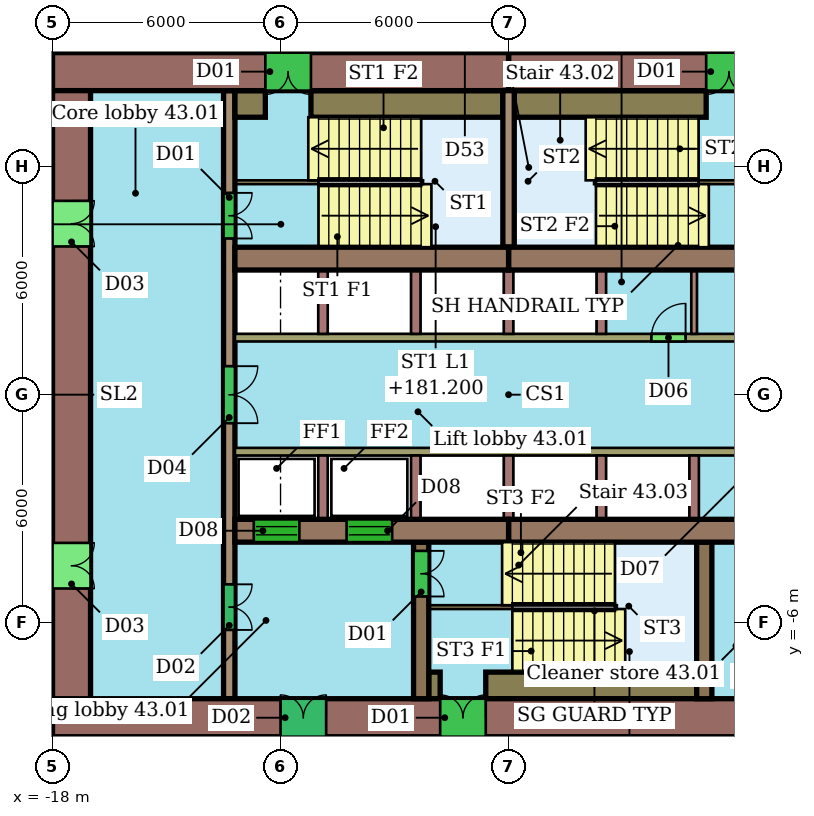
"""IFC4 building model, lengths in metres.
Left out: names, types, materials, properties, quantities, classifications, styles, units other than length and angle.
Written with IfcOpenShell. Run it as: python <this file> out.ifc"""

import sys

from ifc_helpers import new_model, si_unit, direction, frame, frame_2d, origin, place, context, subcontext, project, spatial, rectangle, extrude, element, fill, save


model = new_model("IFC4")
c1 = context("Model", 3, precision=1e-05, world=origin(), true_north=direction((0.0, 1.0)))
c2 = subcontext(c1, "Body", "Model", "MODEL_VIEW")
j1 = project(units=[si_unit("LENGTHUNIT", "METRE"), si_unit("PLANEANGLEUNIT", "RADIAN")], contexts=[c1])
p1 = place(None, origin())
s1 = spatial("IfcSite", under=j1, at=p1, CompositionType="ELEMENT")
p2 = place(p1, origin())
s2 = spatial("IfcBuilding", under=s1, at=p2, CompositionType="ELEMENT")
p3 = place(p2, frame((0.0, 0.0, 179.4)))
s3 = spatial("IfcBuildingStorey", under=s2, at=p3, CompositionType="ELEMENT", Elevation=179.4)
p4 = place(p3, frame((6.0, 8.5, 0.0), z_axis=(0.0, 0.0, 1.0), x_axis=(-1.0, 0.0, 0.0)))
e1 = element("IfcWall", 1, at=p4, inside=s3, PredefinedType="SHEAR", context=c2, shape_type="SweptSolid", body=[
    extrude(rectangle(XDim=12.0, YDim=1.0, at=frame_2d((6.0, 0.0))), origin(), (0.0, 0.0, 1.0), 3.3),
])
p5 = place(p4, frame((5.6, 0.0, 0.0)))
e2 = element("IfcOpeningElement", 2, at=p5, cuts=e1, PredefinedType="OPENING", context=c2, shape_type="SweptSolid", body=[
    extrude(rectangle(XDim=1.2, YDim=2.1, at=frame_2d((0.6, 1.05))), frame((0.0, 0.51, 0.0), z_axis=(0.0, -1.0, 0.0), x_axis=(1.0, 0.0, 0.0)), (0.0, 0.0, 1.0), 1.02),
])
p6 = place(p3, frame((-6.0, 8.5, 0.0), z_axis=(0.0, 0.0, 1.0), x_axis=(-1.0, 0.0, 0.0)))
e3 = element("IfcWall", 3, at=p6, inside=s3, PredefinedType="SHEAR", context=c2, shape_type="SweptSolid", body=[
    extrude(rectangle(XDim=12.0, YDim=1.0, at=frame_2d((6.0, 0.0))), origin(), (0.0, 0.0, 1.0), 3.3),
])
p7 = place(p6, frame((5.2, 0.0, 0.0)))
e4 = element("IfcOpeningElement", 4, at=p7, cuts=e3, PredefinedType="OPENING", context=c2, shape_type="SweptSolid", body=[
    extrude(rectangle(XDim=1.2, YDim=2.1, at=frame_2d((0.6, 1.05))), frame((0.0, 0.51, 0.0), z_axis=(0.0, -1.0, 0.0), x_axis=(1.0, 0.0, 0.0)), (0.0, 0.0, 1.0), 1.02),
])
p8 = place(p3, frame((-18.0, -8.5, 0.0), z_axis=(0.0, 0.0, 1.0), x_axis=(1.0, 0.0, 0.0)))
e5 = element("IfcWall", 5, at=p8, inside=s3, PredefinedType="SHEAR", context=c2, shape_type="SweptSolid", body=[
    extrude(rectangle(XDim=24.0, YDim=1.0, at=frame_2d((12.0, 0.0))), origin(), (0.0, 0.0, 1.0), 3.3),
])
p9 = place(p8, frame((10.2, 0.0, 0.0)))
e6 = element("IfcOpeningElement", 6, at=p9, cuts=e5, PredefinedType="OPENING", context=c2, shape_type="SweptSolid", body=[
    extrude(rectangle(XDim=1.2, YDim=2.1, at=frame_2d((0.6, 1.05))), frame((0.0, 0.51, 0.0), z_axis=(0.0, -1.0, 0.0), x_axis=(1.0, 0.0, 0.0)), (0.0, 0.0, 1.0), 1.02),
])
p10 = place(p8, frame((6.0, 0.0, 0.0)))
e7 = element("IfcOpeningElement", 7, at=p10, cuts=e5, PredefinedType="OPENING", context=c2, shape_type="SweptSolid", body=[
    extrude(rectangle(XDim=1.2, YDim=2.1, at=frame_2d((0.6, 1.05))), frame((0.0, 0.51, 0.0), z_axis=(0.0, -1.0, 0.0), x_axis=(1.0, 0.0, 0.0)), (0.0, 0.0, 1.0), 1.02),
])
p11 = place(p3, frame((-17.5, 8.0, 0.0), z_axis=(0.0, 0.0, 1.0), x_axis=(0.0, -1.0, 0.0)))
e8 = element("IfcWall", 8, at=p11, inside=s3, PredefinedType="SHEAR", context=c2, shape_type="SweptSolid", body=[
    extrude(rectangle(XDim=16.0, YDim=1.0, at=frame_2d((8.0, 0.0))), origin(), (0.0, 0.0, 1.0), 3.3),
])
p12 = place(p11, frame((11.9, 0.0, 0.0)))
e9 = element("IfcOpeningElement", 9, at=p12, cuts=e8, PredefinedType="OPENING", context=c2, shape_type="SweptSolid", body=[
    extrude(rectangle(XDim=1.2, YDim=2.1, at=frame_2d((0.6, 1.05))), frame((0.0, 0.51, 0.0), z_axis=(0.0, -1.0, 0.0), x_axis=(1.0, 0.0, 0.0)), (0.0, 0.0, 1.0), 1.02),
])
p13 = place(p11, frame((2.9, 0.0, 0.0)))
e10 = element("IfcOpeningElement", 10, at=p13, cuts=e8, PredefinedType="OPENING", context=c2, shape_type="SweptSolid", body=[
    extrude(rectangle(XDim=1.2, YDim=2.1, at=frame_2d((0.6, 1.05))), frame((0.0, 0.51, 0.0), z_axis=(0.0, -1.0, 0.0), x_axis=(1.0, 0.0, 0.0)), (0.0, 0.0, 1.0), 1.02),
])
for number, where, z_axis, x_axis in (
    (11, (-13.2, 3.58, 0.0), (0.0, 0.0, 1.0), (1.0, 0.0, 0.0)),
    (12, (-6.0, 3.58, 0.0), (0.0, 0.0, 1.0), (1.0, 0.0, 0.0)),
):
    element("IfcWall", number, at=place(p3, frame(where, z_axis=z_axis, x_axis=x_axis)), inside=s3, PredefinedType="SHEAR", context=c2, shape_type="SweptSolid", body=[
        extrude(rectangle(XDim=7.2, YDim=0.6, at=frame_2d((3.6, 0.0))), origin(), (0.0, 0.0, 1.0), 3.3),
    ])
p14 = place(p3, frame((-13.2, -3.58, 0.0), z_axis=(0.0, 0.0, 1.0), x_axis=(1.0, 0.0, 0.0)))
e13 = element("IfcWall", 13, at=p14, inside=s3, PredefinedType="SHEAR", context=c2, shape_type="SweptSolid", body=[
    extrude(rectangle(XDim=7.2, YDim=0.6, at=frame_2d((3.6, 0.0))), origin(), (0.0, 0.0, 1.0), 3.3),
])
p15 = place(p14, frame((0.496, 0.0, 0.0)))
e14 = element("IfcOpeningElement", 14, at=p15, cuts=e13, PredefinedType="OPENING", context=c2, shape_type="SweptSolid", body=[
    extrude(rectangle(XDim=1.2, YDim=2.1, at=frame_2d((0.6, 1.05))), frame((0.0, 0.31, 0.0), z_axis=(0.0, -1.0, 0.0), x_axis=(1.0, 0.0, 0.0)), (0.0, 0.0, 1.0), 0.62),
])
p16 = place(p14, frame((2.938, 0.0, 0.0)))
e15 = element("IfcOpeningElement", 15, at=p16, cuts=e13, PredefinedType="OPENING", context=c2, shape_type="SweptSolid", body=[
    extrude(rectangle(XDim=1.2, YDim=2.1, at=frame_2d((0.6, 1.05))), frame((0.0, 0.31, 0.0), z_axis=(0.0, -1.0, 0.0), x_axis=(1.0, 0.0, 0.0)), (0.0, 0.0, 1.0), 0.62),
])
p17 = place(p3, frame((-6.0, -3.58, 0.0), z_axis=(0.0, 0.0, 1.0), x_axis=(1.0, 0.0, 0.0)))
e16 = element("IfcWall", 16, at=p17, inside=s3, PredefinedType="SHEAR", context=c2, shape_type="SweptSolid", body=[
    extrude(rectangle(XDim=7.2, YDim=0.6, at=frame_2d((3.6, 0.0))), origin(), (0.0, 0.0, 1.0), 3.3),
])
p18 = place(p3, frame((-13.35, 8.0, 0.0), z_axis=(0.0, 0.0, 1.0), x_axis=(0.0, -1.0, 0.0)))
e17 = element("IfcWall", 17, at=p18, inside=s3, PredefinedType="SHEAR", context=c2, shape_type="SweptSolid", body=[
    extrude(rectangle(XDim=16.0, YDim=0.3, at=frame_2d((8.0, 0.0))), origin(), (0.0, 0.0, 1.0), 3.3),
])
p19 = place(p18, frame((2.69, 0.0, 0.0)))
e18 = element("IfcOpeningElement", 18, at=p19, cuts=e17, PredefinedType="OPENING", context=c2, shape_type="SweptSolid", body=[
    extrude(rectangle(XDim=1.2, YDim=2.1, at=frame_2d((0.6, 1.05))), frame((0.0, 0.16, 0.0), z_axis=(0.0, -1.0, 0.0), x_axis=(1.0, 0.0, 0.0)), (0.0, 0.0, 1.0), 0.32),
])
p20 = place(p18, frame((12.99, 0.0, 0.0)))
e19 = element("IfcOpeningElement", 19, at=p20, cuts=e17, PredefinedType="OPENING", context=c2, shape_type="SweptSolid", body=[
    extrude(rectangle(XDim=1.2, YDim=2.1, at=frame_2d((0.6, 1.05))), frame((0.0, 0.16, 0.0), z_axis=(0.0, -1.0, 0.0), x_axis=(1.0, 0.0, 0.0)), (0.0, 0.0, 1.0), 0.32),
])
p21 = place(p18, frame((7.25, 0.0, 0.0)))
e20 = element("IfcOpeningElement", 20, at=p21, cuts=e17, PredefinedType="OPENING", context=c2, shape_type="SweptSolid", body=[
    extrude(rectangle(XDim=1.5, YDim=2.1, at=frame_2d((0.75, 1.05))), frame((0.0, 0.16, 0.0), z_axis=(0.0, -1.0, 0.0), x_axis=(1.0, 0.0, 0.0)), (0.0, 0.0, 1.0), 0.32),
])
p22 = place(p3, frame((-13.2, 1.5, 0.0), z_axis=(0.0, 0.0, 1.0), x_axis=(1.0, 0.0, 0.0)))
e21 = element("IfcWall", 21, at=p22, inside=s3, PredefinedType="SHEAR", context=c2, shape_type="SweptSolid", body=[
    extrude(rectangle(XDim=14.4, YDim=0.2, at=frame_2d((7.2, 0.0))), origin(), (0.0, 0.0, 1.0), 3.3),
])
p23 = place(p22, frame((10.958, 0.0, 0.0)))
e22 = element("IfcOpeningElement", 22, at=p23, cuts=e21, PredefinedType="OPENING", context=c2, shape_type="SweptSolid", body=[
    extrude(rectangle(XDim=0.9, YDim=2.1, at=frame_2d((0.45, 1.05))), frame((0.0, 0.11, 0.0), z_axis=(0.0, -1.0, 0.0), x_axis=(1.0, 0.0, 0.0)), (0.0, 0.0, 1.0), 0.22),
])
p24 = place(p22, frame((13.35, 0.0, 0.0)))
e23 = element("IfcOpeningElement", 23, at=p24, cuts=e21, PredefinedType="OPENING", context=c2, shape_type="SweptSolid", body=[
    extrude(rectangle(XDim=0.9, YDim=2.1, at=frame_2d((0.45, 1.05))), frame((0.0, 0.11, 0.0), z_axis=(0.0, -1.0, 0.0), x_axis=(1.0, 0.0, 0.0)), (0.0, 0.0, 1.0), 0.22),
])
p25 = place(p3, frame((1.2, -1.5, 0.0), z_axis=(0.0, 0.0, 1.0), x_axis=(-1.0, 0.0, 0.0)))
e24 = element("IfcWall", 24, at=p25, inside=s3, PredefinedType="SHEAR", context=c2, shape_type="SweptSolid", body=[
    extrude(rectangle(XDim=14.4, YDim=0.2, at=frame_2d((7.2, 0.0))), origin(), (0.0, 0.0, 1.0), 3.3),
])
p26 = place(p25, frame((0.15, 0.0, 0.0)))
e25 = element("IfcOpeningElement", 25, at=p26, cuts=e24, PredefinedType="OPENING", context=c2, shape_type="SweptSolid", body=[
    extrude(rectangle(XDim=1.0, YDim=2.1, at=frame_2d((0.5, 1.05))), frame((0.0, 0.11, 0.0), z_axis=(0.0, -1.0, 0.0), x_axis=(1.0, 0.0, 0.0)), (0.0, 0.0, 1.0), 0.22),
])
p27 = place(p3, frame((-8.3, -3.88, 0.0), z_axis=(0.0, 0.0, 1.0), x_axis=(0.0, -1.0, 0.0)))
e26 = element("IfcWall", 26, at=p27, inside=s3, PredefinedType="SHEAR", context=c2, shape_type="SweptSolid", body=[
    extrude(rectangle(XDim=4.12, YDim=0.4, at=frame_2d((2.06, 0.0))), origin(), (0.0, 0.0, 1.0), 3.3),
])
p28 = place(p27, frame((0.23, 0.0, 0.0)))
e27 = element("IfcOpeningElement", 27, at=p28, cuts=e26, PredefinedType="OPENING", context=c2, shape_type="SweptSolid", body=[
    extrude(rectangle(XDim=1.2, YDim=2.1, at=frame_2d((0.6, 1.05))), frame((0.0, 0.21, 0.0), z_axis=(0.0, -1.0, 0.0), x_axis=(1.0, 0.0, 0.0)), (0.0, 0.0, 1.0), 0.42),
])
p29 = place(p3, frame((-0.85, -3.88, 0.0), z_axis=(0.0, 0.0, 1.0), x_axis=(0.0, -1.0, 0.0)))
e28 = element("IfcWall", 28, at=p29, inside=s3, PredefinedType="SHEAR", context=c2, shape_type="SweptSolid", body=[
    extrude(rectangle(XDim=4.12, YDim=0.4, at=frame_2d((2.06, 0.0))), origin(), (0.0, 0.0, 1.0), 3.3),
])
p30 = place(p3, frame((-6.0, 3.88, 0.0), z_axis=(0.0, 0.0, 1.0), x_axis=(0.0, 1.0, 0.0)))
e29 = element("IfcWall", 29, at=p30, inside=s3, PredefinedType="SHEAR", context=c2, shape_type="SweptSolid", body=[
    extrude(rectangle(XDim=4.12, YDim=0.3, at=frame_2d((2.06, 0.0))), origin(), (0.0, 0.0, 1.0), 3.3),
])
p31 = place(p3, frame((-13.2, 7.65, 0.0), z_axis=(0.0, 0.0, 1.0), x_axis=(1.0, 0.0, 0.0)))
e30 = element("IfcWall", 30, at=p31, inside=s3, PredefinedType="SHEAR", context=c2, shape_type="SweptSolid", body=[
    extrude(rectangle(XDim=0.8, YDim=0.7, at=frame_2d((0.4, 0.0))), origin(), (0.0, 0.0, 1.0), 3.3),
])
for number, where, z_axis, x_axis in (
    (31, (-11.2, 7.65, 0.0), (0.0, 0.0, 1.0), (1.0, 0.0, 0.0)),
    (32, (-5.85, 7.65, 0.0), (0.0, 0.0, 1.0), (1.0, 0.0, 0.0)),
):
    element("IfcWall", number, at=place(p3, frame(where, z_axis=z_axis, x_axis=x_axis)), inside=s3, PredefinedType="SHEAR", context=c2, shape_type="SweptSolid", body=[
        extrude(rectangle(XDim=5.05, YDim=0.7, at=frame_2d((2.525, 0.0))), origin(), (0.0, 0.0, 1.0), 3.3),
    ])
p32 = place(p3, frame((-8.1, -7.65, 0.0), z_axis=(0.0, 0.0, 1.0), x_axis=(1.0, 0.0, 0.0)))
e33 = element("IfcWall", 33, at=p32, inside=s3, PredefinedType="SHEAR", context=c2, shape_type="SweptSolid", body=[
    extrude(rectangle(XDim=0.3, YDim=0.7, at=frame_2d((0.15, 0.0))), origin(), (0.0, 0.0, 1.0), 3.3),
])
p33 = place(p3, frame((-6.6, -7.65, 0.0), z_axis=(0.0, 0.0, 1.0), x_axis=(1.0, 0.0, 0.0)))
e34 = element("IfcWall", 34, at=p33, inside=s3, PredefinedType="SHEAR", context=c2, shape_type="SweptSolid", body=[
    extrude(rectangle(XDim=5.55, YDim=0.7, at=frame_2d((2.775, 0.0))), origin(), (0.0, 0.0, 1.0), 3.3),
])
for number, where, z_axis, x_axis in (
    (35, (-13.2, 5.59, 0.0), (0.0, 0.0, 1.0), (1.0, 0.0, 0.0)),
    (36, (1.2, 5.59, 0.0), (0.0, 0.0, 1.0), (-1.0, 0.0, 0.0)),
):
    element("IfcWall", number, at=place(p3, frame(where, z_axis=z_axis, x_axis=x_axis)), inside=s3, PredefinedType="SHEAR", context=c2, shape_type="SweptSolid", body=[
        extrude(rectangle(XDim=2.2, YDim=0.1, at=frame_2d((1.1, 0.0))), origin(), (0.0, 0.0, 1.0), 3.3),
    ])
p34 = place(p3, frame((-8.1, -5.59, 0.0), z_axis=(0.0, 0.0, 1.0), x_axis=(1.0, 0.0, 0.0)))
e37 = element("IfcWall", 37, at=p34, inside=s3, PredefinedType="SHEAR", context=c2, shape_type="SweptSolid", body=[
    extrude(rectangle(XDim=2.2, YDim=0.1, at=frame_2d((1.1, 0.0))), origin(), (0.0, 0.0, 1.0), 3.3),
])
for number, where, z_axis, x_axis in (
    (38, (-10.883, 1.6, 0.0), (0.0, 0.0, 1.0), (0.0, 1.0, 0.0)),
    (39, (-8.442, 1.6, 0.0), (0.0, 0.0, 1.0), (0.0, 1.0, 0.0)),
    (40, (-6.0, 1.6, 0.0), (0.0, 0.0, 1.0), (0.0, 1.0, 0.0)),
    (41, (-3.558, 1.6, 0.0), (0.0, 0.0, 1.0), (0.0, 1.0, 0.0)),
):
    element("IfcWall", number, at=place(p3, frame(where, z_axis=z_axis, x_axis=x_axis)), inside=s3, PredefinedType="SHEAR", context=c2, shape_type="SweptSolid", body=[
        extrude(rectangle(XDim=1.68, YDim=0.25, at=frame_2d((0.84, 0.0))), origin(), (0.0, 0.0, 1.0), 3.3),
    ])
p35 = place(p3, frame((-1.117, 1.6, 0.0), z_axis=(0.0, 0.0, 1.0), x_axis=(0.0, 1.0, 0.0)))
e42 = element("IfcWall", 42, at=p35, inside=s3, PredefinedType="PARTITIONING", context=c2, shape_type="SweptSolid", body=[
    extrude(rectangle(XDim=1.68, YDim=0.15, at=frame_2d((0.84, 0.0))), origin(), (0.0, 0.0, 1.0), 3.3),
])
for number, where, z_axis, x_axis in (
    (43, (-10.883, -1.6, 0.0), (0.0, 0.0, 1.0), (0.0, -1.0, 0.0)),
    (44, (-8.442, -1.6, 0.0), (0.0, 0.0, 1.0), (0.0, -1.0, 0.0)),
    (45, (-6.0, -1.6, 0.0), (0.0, 0.0, 1.0), (0.0, -1.0, 0.0)),
    (46, (-3.558, -1.6, 0.0), (0.0, 0.0, 1.0), (0.0, -1.0, 0.0)),
    (47, (-1.117, -1.6, 0.0), (0.0, 0.0, 1.0), (0.0, -1.0, 0.0)),
):
    element("IfcWall", number, at=place(p3, frame(where, z_axis=z_axis, x_axis=x_axis)), inside=s3, PredefinedType="SHEAR", context=c2, shape_type="SweptSolid", body=[
        extrude(rectangle(XDim=1.68, YDim=0.25, at=frame_2d((0.84, 0.0))), origin(), (0.0, 0.0, 1.0), 3.3),
    ])
p36 = place(p5, origin())
e48 = element("IfcDoor", 48, at=p36, inside=s3, OperationType="DOUBLE_DOOR_SINGLE_SWING", PredefinedType="NOTDEFINED", context=c2, shape_type="SweptSolid", body=[
    extrude(rectangle(XDim=1.2, YDim=2.1, at=frame_2d((0.6, 1.05))), frame((0.0, 0.025, 0.0), z_axis=(0.0, -1.0, 0.0), x_axis=(1.0, 0.0, 0.0)), (0.0, 0.0, 1.0), 0.05),
])
fill(e2, e48)
p37 = place(p7, origin())
e49 = element("IfcDoor", 49, at=p37, inside=s3, OperationType="DOUBLE_DOOR_SINGLE_SWING", PredefinedType="NOTDEFINED", context=c2, shape_type="SweptSolid", body=[
    extrude(rectangle(XDim=1.2, YDim=2.1, at=frame_2d((0.6, 1.05))), frame((0.0, 0.025, 0.0), z_axis=(0.0, -1.0, 0.0), x_axis=(1.0, 0.0, 0.0)), (0.0, 0.0, 1.0), 0.05),
])
fill(e4, e49)
p38 = place(p9, origin())
e50 = element("IfcDoor", 50, at=p38, inside=s3, OperationType="DOUBLE_DOOR_SINGLE_SWING", PredefinedType="NOTDEFINED", context=c2, shape_type="SweptSolid", body=[
    extrude(rectangle(XDim=1.2, YDim=2.1, at=frame_2d((0.6, 1.05))), frame((0.0, 0.025, 0.0), z_axis=(0.0, -1.0, 0.0), x_axis=(1.0, 0.0, 0.0)), (0.0, 0.0, 1.0), 0.05),
])
fill(e6, e50)
p39 = place(p10, origin())
e51 = element("IfcDoor", 51, at=p39, inside=s3, OperationType="DOUBLE_DOOR_SINGLE_SWING", PredefinedType="NOTDEFINED", context=c2, shape_type="SweptSolid", body=[
    extrude(rectangle(XDim=1.2, YDim=2.1, at=frame_2d((0.6, 1.05))), frame((0.0, 0.025, 0.0), z_axis=(0.0, -1.0, 0.0), x_axis=(1.0, 0.0, 0.0)), (0.0, 0.0, 1.0), 0.05),
])
fill(e7, e51)
p40 = place(p12, origin())
e52 = element("IfcDoor", 52, at=p40, inside=s3, OperationType="DOUBLE_DOOR_SINGLE_SWING", PredefinedType="NOTDEFINED", context=c2, shape_type="SweptSolid", body=[
    extrude(rectangle(XDim=1.2, YDim=2.1, at=frame_2d((0.6, 1.05))), frame((0.0, 0.025, 0.0), z_axis=(0.0, -1.0, 0.0), x_axis=(1.0, 0.0, 0.0)), (0.0, 0.0, 1.0), 0.05),
])
fill(e9, e52)
p41 = place(p13, origin())
e53 = element("IfcDoor", 53, at=p41, inside=s3, OperationType="DOUBLE_DOOR_SINGLE_SWING", PredefinedType="NOTDEFINED", context=c2, shape_type="SweptSolid", body=[
    extrude(rectangle(XDim=1.2, YDim=2.1, at=frame_2d((0.6, 1.05))), frame((0.0, 0.025, 0.0), z_axis=(0.0, -1.0, 0.0), x_axis=(1.0, 0.0, 0.0)), (0.0, 0.0, 1.0), 0.05),
])
fill(e10, e53)
p42 = place(p15, origin())
e54 = element("IfcDoor", 54, at=p42, inside=s3, OperationType="DOUBLE_DOOR_SLIDING", PredefinedType="NOTDEFINED", context=c2, shape_type="SweptSolid", body=[
    extrude(rectangle(XDim=1.2, YDim=2.1, at=frame_2d((0.6, 1.05))), frame((0.0, 0.025, 0.0), z_axis=(0.0, -1.0, 0.0), x_axis=(1.0, 0.0, 0.0)), (0.0, 0.0, 1.0), 0.05),
])
fill(e14, e54)
p43 = place(p16, origin())
e55 = element("IfcDoor", 55, at=p43, inside=s3, OperationType="DOUBLE_DOOR_SLIDING", PredefinedType="NOTDEFINED", context=c2, shape_type="SweptSolid", body=[
    extrude(rectangle(XDim=1.2, YDim=2.1, at=frame_2d((0.6, 1.05))), frame((0.0, 0.025, 0.0), z_axis=(0.0, -1.0, 0.0), x_axis=(1.0, 0.0, 0.0)), (0.0, 0.0, 1.0), 0.05),
])
fill(e15, e55)
p44 = place(p19, origin())
e56 = element("IfcDoor", 56, at=p44, inside=s3, OperationType="DOUBLE_DOOR_SINGLE_SWING", PredefinedType="NOTDEFINED", context=c2, shape_type="SweptSolid", body=[
    extrude(rectangle(XDim=1.2, YDim=2.1, at=frame_2d((0.6, 1.05))), frame((0.0, 0.025, 0.0), z_axis=(0.0, -1.0, 0.0), x_axis=(1.0, 0.0, 0.0)), (0.0, 0.0, 1.0), 0.05),
])
fill(e18, e56)
p45 = place(p20, origin())
e57 = element("IfcDoor", 57, at=p45, inside=s3, OperationType="DOUBLE_DOOR_SINGLE_SWING", PredefinedType="NOTDEFINED", context=c2, shape_type="SweptSolid", body=[
    extrude(rectangle(XDim=1.2, YDim=2.1, at=frame_2d((0.6, 1.05))), frame((0.0, 0.025, 0.0), z_axis=(0.0, -1.0, 0.0), x_axis=(1.0, 0.0, 0.0)), (0.0, 0.0, 1.0), 0.05),
])
fill(e19, e57)
p46 = place(p21, origin())
e58 = element("IfcDoor", 58, at=p46, inside=s3, OperationType="DOUBLE_DOOR_SINGLE_SWING", PredefinedType="NOTDEFINED", context=c2, shape_type="SweptSolid", body=[
    extrude(rectangle(XDim=1.5, YDim=2.1, at=frame_2d((0.75, 1.05))), frame((0.0, 0.025, 0.0), z_axis=(0.0, -1.0, 0.0), x_axis=(1.0, 0.0, 0.0)), (0.0, 0.0, 1.0), 0.05),
])
fill(e20, e58)
p47 = place(p23, origin())
e59 = element("IfcDoor", 59, at=p47, inside=s3, OperationType="SINGLE_SWING_RIGHT", PredefinedType="NOTDEFINED", context=c2, shape_type="SweptSolid", body=[
    extrude(rectangle(XDim=0.9, YDim=2.1, at=frame_2d((0.45, 1.05))), frame((0.0, 0.025, 0.0), z_axis=(0.0, -1.0, 0.0), x_axis=(1.0, 0.0, 0.0)), (0.0, 0.0, 1.0), 0.05),
])
fill(e22, e59)
p48 = place(p28, origin())
e60 = element("IfcDoor", 60, at=p48, inside=s3, OperationType="DOUBLE_DOOR_SINGLE_SWING", PredefinedType="NOTDEFINED", context=c2, shape_type="SweptSolid", body=[
    extrude(rectangle(XDim=1.2, YDim=2.1, at=frame_2d((0.6, 1.05))), frame((0.0, 0.025, 0.0), z_axis=(0.0, -1.0, 0.0), x_axis=(1.0, 0.0, 0.0)), (0.0, 0.0, 1.0), 0.05),
])
fill(e27, e60)
save(model, sys.argv[1])
